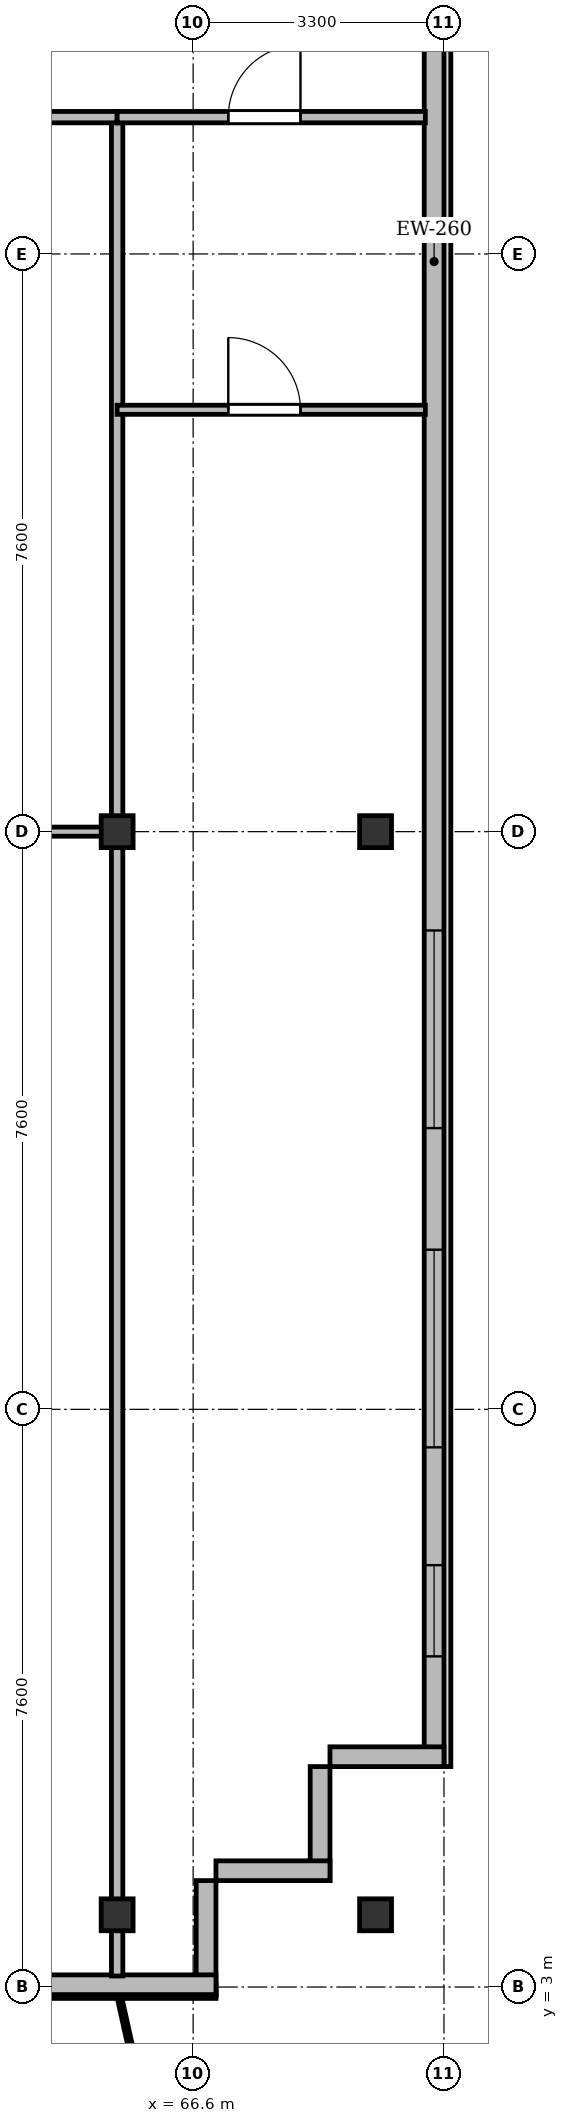
"""IFC4 building model, lengths in metres.
Left out: names, types, materials, properties, quantities, classifications, styles, units other than length and angle.
Written with IfcOpenShell. Run it as: python <this file> out.ifc"""

import sys

from ifc_helpers import new_model, si_unit, direction, frame, frame_2d, origin, origin_2d, place, context, subcontext, project, spatial, rectangle, i_section, extrude, source, transform, mapped, element, fill, save


model = new_model("IFC4")
c1 = context("Model", 3, precision=1e-05, world=origin(), true_north=direction((0.0, 1.0)))
c2 = subcontext(c1, "Body", "Model", "MODEL_VIEW")
j1 = project(units=[si_unit("LENGTHUNIT", "METRE"), si_unit("PLANEANGLEUNIT", "RADIAN")], contexts=[c1])
p1 = place(None, origin())
s1 = spatial("IfcSite", under=j1, at=p1, CompositionType="ELEMENT")
p2 = place(p1, origin())
s2 = spatial("IfcBuilding", under=s1, at=p2, CompositionType="ELEMENT")
p3 = place(p2, frame((0.0, 0.0, 27.1)))
s3 = spatial("IfcBuildingStorey", under=s2, at=p3, CompositionType="ELEMENT", Elevation=27.1)
m1 = source(origin(), c2, "Body", "SweptSolid", [
    extrude(i_section(OverallWidth=0.42, OverallDepth=0.42, WebThickness=0.026, FlangeThickness=0.04, at=origin_2d()), origin(), (0.0, 0.0, 1.0), 3.6),
])
for number, where, z_axis, x_axis in (
    (1, (65.6, 3.95, 0.0), (0.0, 0.0, 1.0), (1.0, 0.0, 0.0)),
    (2, (65.6, 18.2, 0.0), (0.0, 0.0, 1.0), (1.0, 0.0, 0.0)),
    (3, (69.0, 3.95, 0.0), (0.0, 0.0, 1.0), (1.0, 0.0, 0.0)),
    (4, (69.0, 18.2, 0.0), (0.0, 0.0, 1.0), (1.0, 0.0, 0.0)),
):
    element("IfcColumn", number, at=place(p3, frame(where, z_axis=z_axis, x_axis=x_axis)), inside=s3, PredefinedType="COLUMN", context=c2, shape_type="MappedRepresentation", body=[
        mapped(m1, transform((0.0, 0.0, 0.0), x_axis=(1.0, 0.0, 0.0), y_axis=(0.0, 1.0, 0.0), z_axis=(0.0, 0.0, 1.0), scale=1.0)),
    ])
p4 = place(p3, frame((69.77, 45.5, 0.0), z_axis=(0.0, 0.0, 1.0), x_axis=(0.0, -1.0, 0.0)))
e5 = element("IfcWall", 5, at=p4, inside=s3, PredefinedType="SOLIDWALL", context=c2, shape_type="SweptSolid", body=[
    extrude(rectangle(XDim=39.6, YDim=0.26, at=frame_2d((19.8, 0.0))), origin(), (0.0, 0.0, 1.0), 3.34),
])
p5 = place(p4, frame((36.95, 0.0, 0.92)))
e6 = element("IfcOpeningElement", 6, at=p5, cuts=e5, PredefinedType="OPENING", context=c2, shape_type="SweptSolid", body=[
    extrude(rectangle(XDim=1.2, YDim=1.65, at=frame_2d((0.6, 0.825))), frame((0.0, 0.14, 0.0), z_axis=(0.0, -1.0, 0.0), x_axis=(1.0, 0.0, 0.0)), (0.0, 0.0, 1.0), 0.28),
])
p6 = place(p4, frame((32.8, 0.0, 0.92)))
e7 = element("IfcOpeningElement", 7, at=p6, cuts=e5, PredefinedType="OPENING", context=c2, shape_type="SweptSolid", body=[
    extrude(rectangle(XDim=2.6, YDim=1.9, at=frame_2d((1.3, 0.95))), frame((0.0, 0.14, 0.0), z_axis=(0.0, -1.0, 0.0), x_axis=(1.0, 0.0, 0.0)), (0.0, 0.0, 1.0), 0.28),
])
p7 = place(p4, frame((28.6, 0.0, 0.92)))
e8 = element("IfcOpeningElement", 8, at=p7, cuts=e5, PredefinedType="OPENING", context=c2, shape_type="SweptSolid", body=[
    extrude(rectangle(XDim=2.6, YDim=1.9, at=frame_2d((1.3, 0.95))), frame((0.0, 0.14, 0.0), z_axis=(0.0, -1.0, 0.0), x_axis=(1.0, 0.0, 0.0)), (0.0, 0.0, 1.0), 0.28),
])
p8 = place(p4, frame((7.4, 0.0, 0.92)))
e9 = element("IfcOpeningElement", 9, at=p8, cuts=e5, PredefinedType="OPENING", context=c2, shape_type="SweptSolid", body=[
    extrude(rectangle(XDim=2.6, YDim=1.9, at=frame_2d((1.3, 0.95))), frame((0.0, 0.14, 0.0), z_axis=(0.0, -1.0, 0.0), x_axis=(1.0, 0.0, 0.0)), (0.0, 0.0, 1.0), 0.28),
])
p9 = place(p4, frame((4.5, 0.0, 0.92)))
e10 = element("IfcOpeningElement", 10, at=p9, cuts=e5, PredefinedType="OPENING", context=c2, shape_type="SweptSolid", body=[
    extrude(rectangle(XDim=1.2, YDim=1.65, at=frame_2d((0.6, 0.825))), frame((0.0, 0.14, 0.0), z_axis=(0.0, -1.0, 0.0), x_axis=(1.0, 0.0, 0.0)), (0.0, 0.0, 1.0), 0.28),
])
p10 = place(p4, frame((1.15, 0.0, 0.92)))
e11 = element("IfcOpeningElement", 11, at=p10, cuts=e5, PredefinedType="OPENING", context=c2, shape_type="SweptSolid", body=[
    extrude(rectangle(XDim=1.2, YDim=1.65, at=frame_2d((0.6, 0.825))), frame((0.0, 0.14, 0.0), z_axis=(0.0, -1.0, 0.0), x_axis=(1.0, 0.0, 0.0)), (0.0, 0.0, 1.0), 0.28),
])
p11 = place(p3, frame((69.9, 6.03, 0.0), z_axis=(0.0, 0.0, 1.0), x_axis=(-1.0, 0.0, 0.0)))
e12 = element("IfcWall", 12, at=p11, inside=s3, PredefinedType="SOLIDWALL", context=c2, shape_type="SweptSolid", body=[
    extrude(rectangle(XDim=1.5, YDim=0.26, at=frame_2d((0.75, 0.0))), origin(), (0.0, 0.0, 1.0), 2.752),
])
for number, where, z_axis, x_axis in (
    (13, (68.27, 5.9, 0.0), (0.0, 0.0, 1.0), (0.0, -1.0, 0.0)),
    (14, (68.4, 4.53, 0.0), (0.0, 0.0, 1.0), (-1.0, 0.0, 0.0)),
):
    element("IfcWall", number, at=place(p3, frame(where, z_axis=z_axis, x_axis=x_axis)), inside=s3, PredefinedType="SOLIDWALL", context=c2, shape_type="SweptSolid", body=[
        extrude(rectangle(XDim=1.5, YDim=0.26, at=frame_2d((0.75, 0.0))), origin(), (0.0, 0.0, 1.0), 3.34),
    ])
p12 = place(p3, frame((66.77, 4.4, 0.0), z_axis=(0.0, 0.0, 1.0), x_axis=(0.0, -1.0, 0.0)))
e15 = element("IfcWall", 15, at=p12, inside=s3, PredefinedType="SOLIDWALL", context=c2, shape_type="SweptSolid", body=[
    extrude(rectangle(XDim=1.5, YDim=0.26, at=frame_2d((0.75, 0.0))), origin(), (0.0, 0.0, 1.0), 2.69),
])
p13 = place(p3, frame((66.9, 3.03, 0.0), z_axis=(0.0, 0.0, 1.0), x_axis=(-1.0, 0.0, 0.0)))
e16 = element("IfcWall", 16, at=p13, inside=s3, PredefinedType="SOLIDWALL", context=c2, shape_type="SweptSolid", body=[
    extrude(rectangle(XDim=59.4, YDim=0.26, at=frame_2d((29.7, 0.0))), origin(), (0.0, 0.0, 1.0), 3.34),
])
p14 = place(p13, frame((3.95, 0.0, 0.9)))
e17 = element("IfcOpeningElement", 17, at=p14, cuts=e16, PredefinedType="OPENING", context=c2, shape_type="SweptSolid", body=[
    extrude(rectangle(XDim=1.5, YDim=1.75, at=frame_2d((0.75, 0.875))), frame((0.0, 0.14, 0.0), z_axis=(0.0, -1.0, 0.0), x_axis=(1.0, 0.0, 0.0)), (0.0, 0.0, 1.0), 0.28),
])
p15 = place(p13, frame((9.05, 0.0, 0.9)))
e18 = element("IfcOpeningElement", 18, at=p15, cuts=e16, PredefinedType="OPENING", context=c2, shape_type="SweptSolid", body=[
    extrude(rectangle(XDim=2.0, YDim=1.95, at=frame_2d((1.0, 0.975))), frame((0.0, 0.14, 0.0), z_axis=(0.0, -1.0, 0.0), x_axis=(1.0, 0.0, 0.0)), (0.0, 0.0, 1.0), 0.28),
])
p16 = place(p13, frame((13.125, 0.0, 0.9)))
e19 = element("IfcOpeningElement", 19, at=p16, cuts=e16, PredefinedType="OPENING", context=c2, shape_type="SweptSolid", body=[
    extrude(rectangle(XDim=1.65, YDim=1.85, at=frame_2d((0.825, 0.925))), frame((0.0, 0.14, 0.0), z_axis=(0.0, -1.0, 0.0), x_axis=(1.0, 0.0, 0.0)), (0.0, 0.0, 1.0), 0.28),
])
p17 = place(p13, frame((17.007, 0.0, 0.0)))
e20 = element("IfcOpeningElement", 20, at=p17, cuts=e16, PredefinedType="OPENING", context=c2, shape_type="SweptSolid", body=[
    extrude(rectangle(XDim=1.2, YDim=2.2, at=frame_2d((0.6, 1.1))), frame((0.0, 0.14, 0.0), z_axis=(0.0, -1.0, 0.0), x_axis=(1.0, 0.0, 0.0)), (0.0, 0.0, 1.0), 0.28),
])
p18 = place(p13, frame((20.2, 0.0, 0.9)))
e21 = element("IfcOpeningElement", 21, at=p18, cuts=e16, PredefinedType="OPENING", context=c2, shape_type="SweptSolid", body=[
    extrude(rectangle(XDim=2.2, YDim=1.8, at=frame_2d((1.1, 0.9))), frame((0.0, 0.14, 0.0), z_axis=(0.0, -1.0, 0.0), x_axis=(1.0, 0.0, 0.0)), (0.0, 0.0, 1.0), 0.28),
])
p19 = place(p13, frame((24.0, 0.0, 0.9)))
e22 = element("IfcOpeningElement", 22, at=p19, cuts=e16, PredefinedType="OPENING", context=c2, shape_type="SweptSolid", body=[
    extrude(rectangle(XDim=1.5, YDim=1.75, at=frame_2d((0.75, 0.875))), frame((0.0, 0.14, 0.0), z_axis=(0.0, -1.0, 0.0), x_axis=(1.0, 0.0, 0.0)), (0.0, 0.0, 1.0), 0.28),
])
p20 = place(p13, frame((27.05, 0.0, 0.9)))
e23 = element("IfcOpeningElement", 23, at=p20, cuts=e16, PredefinedType="OPENING", context=c2, shape_type="SweptSolid", body=[
    extrude(rectangle(XDim=2.0, YDim=1.95, at=frame_2d((1.0, 0.975))), frame((0.0, 0.14, 0.0), z_axis=(0.0, -1.0, 0.0), x_axis=(1.0, 0.0, 0.0)), (0.0, 0.0, 1.0), 0.28),
])
p21 = place(p13, frame((32.175, 0.0, 0.9)))
e24 = element("IfcOpeningElement", 24, at=p21, cuts=e16, PredefinedType="OPENING", context=c2, shape_type="SweptSolid", body=[
    extrude(rectangle(XDim=1.65, YDim=1.85, at=frame_2d((0.825, 0.925))), frame((0.0, 0.14, 0.0), z_axis=(0.0, -1.0, 0.0), x_axis=(1.0, 0.0, 0.0)), (0.0, 0.0, 1.0), 0.28),
])
p22 = place(p13, frame((36.6, 0.0, 0.9)))
e25 = element("IfcOpeningElement", 25, at=p22, cuts=e16, PredefinedType="OPENING", context=c2, shape_type="SweptSolid", body=[
    extrude(rectangle(XDim=1.8, YDim=1.8, at=frame_2d((0.9, 0.9))), frame((0.0, 0.14, 0.0), z_axis=(0.0, -1.0, 0.0), x_axis=(1.0, 0.0, 0.0)), (0.0, 0.0, 1.0), 0.28),
])
p23 = place(p13, frame((39.15, 0.0, 0.9)))
e26 = element("IfcOpeningElement", 26, at=p23, cuts=e16, PredefinedType="OPENING", context=c2, shape_type="SweptSolid", body=[
    extrude(rectangle(XDim=1.5, YDim=1.75, at=frame_2d((0.75, 0.875))), frame((0.0, 0.14, 0.0), z_axis=(0.0, -1.0, 0.0), x_axis=(1.0, 0.0, 0.0)), (0.0, 0.0, 1.0), 0.28),
])
p24 = place(p13, frame((41.55, 0.0, 0.9)))
e27 = element("IfcOpeningElement", 27, at=p24, cuts=e16, PredefinedType="OPENING", context=c2, shape_type="SweptSolid", body=[
    extrude(rectangle(XDim=1.5, YDim=1.75, at=frame_2d((0.75, 0.875))), frame((0.0, 0.14, 0.0), z_axis=(0.0, -1.0, 0.0), x_axis=(1.0, 0.0, 0.0)), (0.0, 0.0, 1.0), 0.28),
])
p25 = place(p13, frame((45.435, 0.0, 0.0)))
e28 = element("IfcOpeningElement", 28, at=p25, cuts=e16, PredefinedType="OPENING", context=c2, shape_type="SweptSolid", body=[
    extrude(rectangle(XDim=1.2, YDim=2.2, at=frame_2d((0.6, 1.1))), frame((0.0, 0.14, 0.0), z_axis=(0.0, -1.0, 0.0), x_axis=(1.0, 0.0, 0.0)), (0.0, 0.0, 1.0), 0.28),
])
p26 = place(p13, frame((48.525, 0.0, 0.9)))
e29 = element("IfcOpeningElement", 29, at=p26, cuts=e16, PredefinedType="OPENING", context=c2, shape_type="SweptSolid", body=[
    extrude(rectangle(XDim=1.65, YDim=1.85, at=frame_2d((0.825, 0.925))), frame((0.0, 0.14, 0.0), z_axis=(0.0, -1.0, 0.0), x_axis=(1.0, 0.0, 0.0)), (0.0, 0.0, 1.0), 0.28),
])
p27 = place(p13, frame((52.1, 0.0, 0.9)))
e30 = element("IfcOpeningElement", 30, at=p27, cuts=e16, PredefinedType="OPENING", context=c2, shape_type="SweptSolid", body=[
    extrude(rectangle(XDim=1.8, YDim=1.8, at=frame_2d((0.9, 0.9))), frame((0.0, 0.14, 0.0), z_axis=(0.0, -1.0, 0.0), x_axis=(1.0, 0.0, 0.0)), (0.0, 0.0, 1.0), 0.28),
])
p28 = place(p13, frame((55.3, 0.0, 0.9)))
e31 = element("IfcOpeningElement", 31, at=p28, cuts=e16, PredefinedType="OPENING", context=c2, shape_type="SweptSolid", body=[
    extrude(rectangle(XDim=2.2, YDim=1.8, at=frame_2d((1.1, 0.9))), frame((0.0, 0.14, 0.0), z_axis=(0.0, -1.0, 0.0), x_axis=(1.0, 0.0, 0.0)), (0.0, 0.0, 1.0), 0.28),
])
p29 = place(p3, frame((65.6, 3.145, 0.0), z_axis=(0.0, 0.0, 1.0), x_axis=(0.0, 1.0, 0.0)))
e32 = element("IfcWall", 32, at=p29, inside=s3, PredefinedType="PARTITIONING", context=c2, shape_type="SweptSolid", body=[
    extrude(rectangle(XDim=24.455, YDim=0.15, at=frame_2d((12.228, 0.0))), origin(), (0.0, 0.0, 1.0), 2.752),
])
p30 = place(p3, frame((58.8, 27.6, 0.0), z_axis=(0.0, 0.0, 1.0), x_axis=(1.0, 0.0, 0.0)))
e33 = element("IfcWall", 33, at=p30, inside=s3, PredefinedType="PARTITIONING", context=c2, shape_type="SweptSolid", body=[
    extrude(rectangle(XDim=6.8, YDim=0.15, at=frame_2d((3.4, 0.0))), origin(), (0.0, 0.0, 1.0), 2.752),
])
p31 = place(p30, frame((2.925, 0.0, 0.0)))
e34 = element("IfcOpeningElement", 34, at=p31, cuts=e33, PredefinedType="OPENING", context=c2, shape_type="SweptSolid", body=[
    extrude(rectangle(XDim=0.95, YDim=2.15, at=frame_2d((0.475, 1.075))), frame((0.0, 0.085, 0.0), z_axis=(0.0, -1.0, 0.0), x_axis=(1.0, 0.0, 0.0)), (0.0, 0.0, 1.0), 0.17),
])
p32 = place(p3, frame((58.8, 18.2, 0.0), z_axis=(0.0, 0.0, 1.0), x_axis=(1.0, 0.0, 0.0)))
e35 = element("IfcWall", 35, at=p32, inside=s3, PredefinedType="PARTITIONING", context=c2, shape_type="SweptSolid", body=[
    extrude(rectangle(XDim=6.8, YDim=0.12, at=frame_2d((3.4, 0.0))), origin(), (0.0, 0.0, 1.0), 2.69),
])
p33 = place(p32, frame((2.925, 0.0, 0.0)))
e36 = element("IfcOpeningElement", 36, at=p33, cuts=e35, PredefinedType="OPENING", context=c2, shape_type="SweptSolid", body=[
    extrude(rectangle(XDim=0.95, YDim=2.15, at=frame_2d((0.475, 1.075))), frame((0.0, 0.07, 0.0), z_axis=(0.0, -1.0, 0.0), x_axis=(1.0, 0.0, 0.0)), (0.0, 0.0, 1.0), 0.14),
])
p34 = place(p3, frame((65.6, 27.6, 0.0), z_axis=(0.0, 0.0, 1.0), x_axis=(1.0, 0.0, 0.0)))
e37 = element("IfcWall", 37, at=p34, inside=s3, PredefinedType="PARTITIONING", context=c2, shape_type="SweptSolid", body=[
    extrude(rectangle(XDim=4.055, YDim=0.15, at=frame_2d((2.027, 0.0))), origin(), (0.0, 0.0, 1.0), 2.752),
])
p35 = place(p34, frame((1.462, 0.0, 0.0)))
e38 = element("IfcOpeningElement", 38, at=p35, cuts=e37, PredefinedType="OPENING", context=c2, shape_type="SweptSolid", body=[
    extrude(rectangle(XDim=0.95, YDim=2.15, at=frame_2d((0.475, 1.075))), frame((0.0, 0.085, 0.0), z_axis=(0.0, -1.0, 0.0), x_axis=(1.0, 0.0, 0.0)), (0.0, 0.0, 1.0), 0.17),
])
p36 = place(p3, frame((65.6, 23.75, 0.0), z_axis=(0.0, 0.0, 1.0), x_axis=(1.0, 0.0, 0.0)))
e39 = element("IfcWall", 39, at=p36, inside=s3, PredefinedType="PARTITIONING", context=c2, shape_type="SweptSolid", body=[
    extrude(rectangle(XDim=4.055, YDim=0.12, at=frame_2d((2.027, 0.0))), origin(), (0.0, 0.0, 1.0), 2.752),
])
p37 = place(p36, frame((1.462, 0.0, 0.0)))
e40 = element("IfcOpeningElement", 40, at=p37, cuts=e39, PredefinedType="OPENING", context=c2, shape_type="SweptSolid", body=[
    extrude(rectangle(XDim=0.95, YDim=2.15, at=frame_2d((0.475, 1.075))), frame((0.0, 0.07, 0.0), z_axis=(0.0, -1.0, 0.0), x_axis=(1.0, 0.0, 0.0)), (0.0, 0.0, 1.0), 0.14),
])
m2 = source(origin(), c2, "Body", "SweptSolid", [
    extrude(rectangle(XDim=1.2, YDim=1.65, at=frame_2d((0.6, 0.825))), frame((0.0, 0.03, 0.0), z_axis=(0.0, -1.0, 0.0), x_axis=(1.0, 0.0, 0.0)), (0.0, 0.0, 1.0), 0.06),
])
p38 = place(p5, origin())
e41 = element("IfcWindow", 41, at=p38, inside=s3, PartitioningType="SINGLE_PANEL", PredefinedType="WINDOW", context=c2, shape_type="MappedRepresentation", body=[
    mapped(m2, transform((0.0, 0.0, 0.0), x_axis=(1.0, 0.0, 0.0), y_axis=(0.0, 1.0, 0.0), z_axis=(0.0, 0.0, 1.0), scale=1.0)),
])
fill(e6, e41)
m3 = source(origin(), c2, "Body", "SweptSolid", [
    extrude(rectangle(XDim=2.6, YDim=1.9, at=frame_2d((1.3, 0.95))), frame((0.0, 0.03, 0.0), z_axis=(0.0, -1.0, 0.0), x_axis=(1.0, 0.0, 0.0)), (0.0, 0.0, 1.0), 0.06),
])
p39 = place(p6, origin())
e42 = element("IfcWindow", 42, at=p39, inside=s3, PartitioningType="SINGLE_PANEL", PredefinedType="WINDOW", context=c2, shape_type="MappedRepresentation", body=[
    mapped(m3, transform((0.0, 0.0, 0.0), x_axis=(1.0, 0.0, 0.0), y_axis=(0.0, 1.0, 0.0), z_axis=(0.0, 0.0, 1.0), scale=1.0)),
])
fill(e7, e42)
p40 = place(p7, origin())
e43 = element("IfcWindow", 43, at=p40, inside=s3, PartitioningType="SINGLE_PANEL", PredefinedType="WINDOW", context=c2, shape_type="MappedRepresentation", body=[
    mapped(m3, transform((0.0, 0.0, 0.0), x_axis=(1.0, 0.0, 0.0), y_axis=(0.0, 1.0, 0.0), z_axis=(0.0, 0.0, 1.0), scale=1.0)),
])
fill(e8, e43)
m4 = source(origin(), c2, "Body", "SweptSolid", [
    extrude(rectangle(XDim=0.95, YDim=2.15, at=frame_2d((0.475, 1.075))), frame((0.0, 0.025, 0.0), z_axis=(0.0, -1.0, 0.0), x_axis=(1.0, 0.0, 0.0)), (0.0, 0.0, 1.0), 0.05),
])
p41 = place(p35, origin())
e44 = element("IfcDoor", 44, at=p41, inside=s3, OperationType="SINGLE_SWING_RIGHT", PredefinedType="DOOR", context=c2, shape_type="MappedRepresentation", body=[
    mapped(m4, transform((0.0, 0.0, 0.0), x_axis=(1.0, 0.0, 0.0), y_axis=(0.0, 1.0, 0.0), z_axis=(0.0, 0.0, 1.0), scale=1.0)),
])
fill(e38, e44)
p42 = place(p37, origin())
e45 = element("IfcDoor", 45, at=p42, inside=s3, OperationType="SINGLE_SWING_LEFT", PredefinedType="DOOR", context=c2, shape_type="MappedRepresentation", body=[
    mapped(m4, transform((0.0, 0.0, 0.0), x_axis=(1.0, 0.0, 0.0), y_axis=(0.0, 1.0, 0.0), z_axis=(0.0, 0.0, 1.0), scale=1.0)),
])
fill(e40, e45)
save(model, sys.argv[1])
